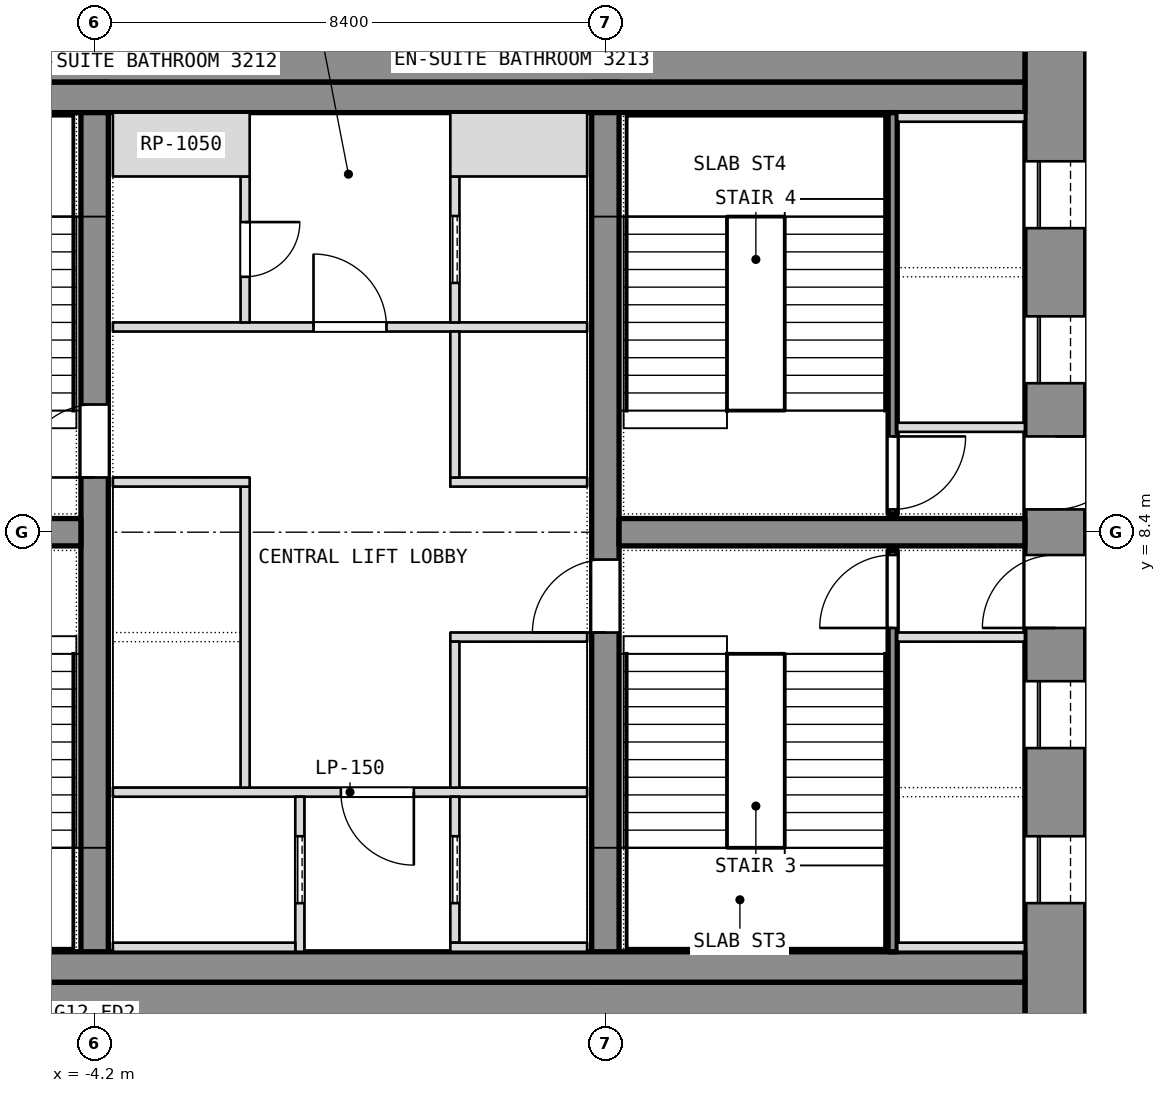
"""IFC4 building model, lengths in metres.
Left out: names, types, materials, properties, quantities, classifications, styles, units other than length and angle.
Written with IfcOpenShell. Run it as: python <this file> out.ifc"""

import sys

from ifc_helpers import new_model, si_unit, direction, frame, frame_2d, origin, place, context, subcontext, project, spatial, rectangle, extrude, element, fill, save


model = new_model("IFC4")
c1 = context("Model", 3, precision=1e-05, world=origin(), true_north=direction((0.0, 1.0)))
c2 = subcontext(c1, "Body", "Model", "MODEL_VIEW")
j1 = project(units=[si_unit("LENGTHUNIT", "METRE"), si_unit("PLANEANGLEUNIT", "RADIAN")], contexts=[c1])
p1 = place(None, origin())
s1 = spatial("IfcSite", under=j1, at=p1, CompositionType="ELEMENT")
p2 = place(p1, origin())
s2 = spatial("IfcBuilding", under=s1, at=p2, CompositionType="ELEMENT")
p3 = place(p2, frame((0.0, 0.0, 140.9)))
s3 = spatial("IfcBuildingStorey", under=s2, at=p3, CompositionType="ELEMENT", Elevation=140.9)
p4 = place(p3, frame((11.6, 0.0, 0.0), z_axis=(0.0, 0.0, 1.0), x_axis=(0.0, 1.0, 0.0)))
e1 = element("IfcWall", 1, at=p4, inside=s3, PredefinedType="SHEAR", context=c2, shape_type="SweptSolid", body=[
    extrude(rectangle(XDim=16.8, YDim=1.0, at=frame_2d((8.4, 0.0))), origin(), (0.0, 0.0, 1.0), 3.6),
])
p5 = place(p4, frame((2.3, 0.0, 0.0)))
e2 = element("IfcOpeningElement", 2, at=p5, cuts=e1, PredefinedType="OPENING", context=c2, shape_type="SweptSolid", body=[
    extrude(rectangle(XDim=1.1, YDim=2.1, at=frame_2d((0.55, 1.05))), frame((0.0, 0.5, 0.0), z_axis=(0.0, -1.0, 0.0), x_axis=(1.0, 0.0, 0.0)), (0.0, 0.0, 1.0), 1.0),
])
p6 = place(p4, frame((4.85, 0.0, 0.0)))
e3 = element("IfcOpeningElement", 3, at=p6, cuts=e1, PredefinedType="OPENING", context=c2, shape_type="SweptSolid", body=[
    extrude(rectangle(XDim=1.1, YDim=2.1, at=frame_2d((0.55, 1.05))), frame((0.0, 0.5, 0.0), z_axis=(0.0, -1.0, 0.0), x_axis=(1.0, 0.0, 0.0)), (0.0, 0.0, 1.0), 1.0),
])
p7 = place(p4, frame((6.825, 0.0, 0.0)))
e4 = element("IfcOpeningElement", 4, at=p7, cuts=e1, PredefinedType="OPENING", context=c2, shape_type="SweptSolid", body=[
    extrude(rectangle(XDim=1.2, YDim=2.1, at=frame_2d((0.6, 1.05))), frame((0.0, 0.5, 0.0), z_axis=(0.0, -1.0, 0.0), x_axis=(1.0, 0.0, 0.0)), (0.0, 0.0, 1.0), 1.0),
])
p8 = place(p4, frame((13.4, 0.0, 0.0)))
e5 = element("IfcOpeningElement", 5, at=p8, cuts=e1, PredefinedType="OPENING", context=c2, shape_type="SweptSolid", body=[
    extrude(rectangle(XDim=1.1, YDim=2.1, at=frame_2d((0.55, 1.05))), frame((0.0, 0.5, 0.0), z_axis=(0.0, -1.0, 0.0), x_axis=(1.0, 0.0, 0.0)), (0.0, 0.0, 1.0), 1.0),
])
p9 = place(p4, frame((10.85, 0.0, 0.0)))
e6 = element("IfcOpeningElement", 6, at=p9, cuts=e1, PredefinedType="OPENING", context=c2, shape_type="SweptSolid", body=[
    extrude(rectangle(XDim=1.1, YDim=2.1, at=frame_2d((0.55, 1.05))), frame((0.0, 0.5, 0.0), z_axis=(0.0, -1.0, 0.0), x_axis=(1.0, 0.0, 0.0)), (0.0, 0.0, 1.0), 1.0),
])
p10 = place(p4, frame((8.775, 0.0, 0.0)))
e7 = element("IfcOpeningElement", 7, at=p10, cuts=e1, PredefinedType="OPENING", context=c2, shape_type="SweptSolid", body=[
    extrude(rectangle(XDim=1.2, YDim=2.1, at=frame_2d((0.6, 1.05))), frame((0.0, 0.5, 0.0), z_axis=(0.0, -1.0, 0.0), x_axis=(1.0, 0.0, 0.0)), (0.0, 0.0, 1.0), 1.0),
])
for number, where, z_axis, x_axis in (
    (8, (-11.1, 0.5, 0.0), (0.0, 0.0, 1.0), (1.0, 0.0, 0.0)),
    (9, (-11.1, 16.3, 0.0), (0.0, 0.0, 1.0), (1.0, 0.0, 0.0)),
):
    element("IfcWall", number, at=place(p3, frame(where, z_axis=z_axis, x_axis=x_axis)), inside=s3, PredefinedType="SHEAR", context=c2, shape_type="SweptSolid", body=[
        extrude(rectangle(XDim=22.2, YDim=1.0, at=frame_2d((11.1, 0.0))), origin(), (0.0, 0.0, 1.0), 3.6),
    ])
p11 = place(p3, frame((-4.2, 1.0, 0.0), z_axis=(0.0, 0.0, 1.0), x_axis=(0.0, 1.0, 0.0)))
e10 = element("IfcWall", 10, at=p11, inside=s3, PredefinedType="SHEAR", context=c2, shape_type="SweptSolid", body=[
    extrude(rectangle(XDim=14.8, YDim=0.45, at=frame_2d((7.4, 0.0))), origin(), (0.0, 0.0, 1.0), 3.6),
])
p12 = place(p11, frame((8.3, 0.0, 0.0)))
e11 = element("IfcOpeningElement", 11, at=p12, cuts=e10, PredefinedType="OPENING", context=c2, shape_type="SweptSolid", body=[
    extrude(rectangle(XDim=1.2, YDim=2.1, at=frame_2d((0.6, 1.05))), frame((0.0, 0.225, 0.0), z_axis=(0.0, -1.0, 0.0), x_axis=(1.0, 0.0, 0.0)), (0.0, 0.0, 1.0), 0.45),
])
p13 = place(p3, frame((4.2, 1.0, 0.0), z_axis=(0.0, 0.0, 1.0), x_axis=(0.0, 1.0, 0.0)))
e12 = element("IfcWall", 12, at=p13, inside=s3, PredefinedType="SHEAR", context=c2, shape_type="SweptSolid", body=[
    extrude(rectangle(XDim=14.8, YDim=0.45, at=frame_2d((7.4, 0.0))), origin(), (0.0, 0.0, 1.0), 3.6),
])
p14 = place(p13, frame((5.75, 0.0, 0.0)))
e13 = element("IfcOpeningElement", 13, at=p14, cuts=e12, PredefinedType="OPENING", context=c2, shape_type="SweptSolid", body=[
    extrude(rectangle(XDim=1.2, YDim=2.1, at=frame_2d((0.6, 1.05))), frame((0.0, 0.225, 0.0), z_axis=(0.0, -1.0, 0.0), x_axis=(1.0, 0.0, 0.0)), (0.0, 0.0, 1.0), 0.45),
])
for number, where, z_axis, x_axis in (
    (14, (-11.1, 8.4, 0.0), (0.0, 0.0, 1.0), (1.0, 0.0, 0.0)),
    (15, (4.425, 8.4, 0.0), (0.0, 0.0, 1.0), (1.0, 0.0, 0.0)),
):
    element("IfcWall", number, at=place(p3, frame(where, z_axis=z_axis, x_axis=x_axis)), inside=s3, PredefinedType="SHEAR", context=c2, shape_type="SweptSolid", body=[
        extrude(rectangle(XDim=6.675, YDim=0.45, at=frame_2d((3.337, 0.0))), origin(), (0.0, 0.0, 1.0), 3.6),
    ])
for number, where, z_axis, x_axis in (
    (16, (-11.1, 1.25, 0.0), (0.0, 0.0, 1.0), (1.0, 0.0, 0.0)),
    (17, (-11.1, 15.55, 0.0), (0.0, 0.0, 1.0), (1.0, 0.0, 0.0)),
):
    element("IfcWall", number, at=place(p3, frame(where, z_axis=z_axis, x_axis=x_axis)), inside=s3, PredefinedType="PARTITIONING", context=c2, shape_type="SweptSolid", body=[
        extrude(rectangle(XDim=22.2, YDim=0.5, at=frame_2d((11.1, 0.0))), origin(), (0.0, 0.0, 1.0), 3.34),
    ])
p15 = place(p3, frame((8.925, 1.5, 0.0), z_axis=(0.0, 0.0, 1.0), x_axis=(0.0, 1.0, 0.0)))
e18 = element("IfcWall", 18, at=p15, inside=s3, PredefinedType="SHEAR", context=c2, shape_type="SweptSolid", body=[
    extrude(rectangle(XDim=6.6, YDim=0.15, at=frame_2d((3.3, 0.0))), origin(), (0.0, 0.0, 1.0), 3.34),
])
p16 = place(p15, frame((5.325, 0.0, 0.0)))
e19 = element("IfcOpeningElement", 19, at=p16, cuts=e18, PredefinedType="OPENING", context=c2, shape_type="SweptSolid", body=[
    extrude(rectangle(XDim=1.2, YDim=2.1, at=frame_2d((0.6, 1.05))), frame((0.0, 0.075, 0.0), z_axis=(0.0, -1.0, 0.0), x_axis=(1.0, 0.0, 0.0)), (0.0, 0.0, 1.0), 0.15),
])
for number, where, z_axis, x_axis in (
    (20, (9.0, 6.675, 0.0), (0.0, 0.0, 1.0), (1.0, 0.0, 0.0)),
    (21, (9.0, 1.575, 0.0), (0.0, 0.0, 1.0), (1.0, 0.0, 0.0)),
):
    element("IfcWall", number, at=place(p3, frame(where, z_axis=z_axis, x_axis=x_axis)), inside=s3, PredefinedType="SHEAR", context=c2, shape_type="SweptSolid", body=[
        extrude(rectangle(XDim=2.1, YDim=0.15, at=frame_2d((1.05, 0.0))), origin(), (0.0, 0.0, 1.0), 3.6),
    ])
p17 = place(p3, frame((8.925, 8.7, 0.0), z_axis=(0.0, 0.0, 1.0), x_axis=(0.0, 1.0, 0.0)))
e22 = element("IfcWall", 22, at=p17, inside=s3, PredefinedType="SHEAR", context=c2, shape_type="SweptSolid", body=[
    extrude(rectangle(XDim=6.6, YDim=0.15, at=frame_2d((3.3, 0.0))), origin(), (0.0, 0.0, 1.0), 3.34),
])
p18 = place(p17, frame((0.075, 0.0, 0.0)))
e23 = element("IfcOpeningElement", 23, at=p18, cuts=e22, PredefinedType="OPENING", context=c2, shape_type="SweptSolid", body=[
    extrude(rectangle(XDim=1.2, YDim=2.1, at=frame_2d((0.6, 1.05))), frame((0.0, 0.075, 0.0), z_axis=(0.0, -1.0, 0.0), x_axis=(1.0, 0.0, 0.0)), (0.0, 0.0, 1.0), 0.15),
])
for number, where, z_axis, x_axis in (
    (24, (9.0, 10.125, 0.0), (0.0, 0.0, 1.0), (1.0, 0.0, 0.0)),
    (25, (9.0, 15.225, 0.0), (0.0, 0.0, 1.0), (1.0, 0.0, 0.0)),
):
    element("IfcWall", number, at=place(p3, frame(where, z_axis=z_axis, x_axis=x_axis)), inside=s3, PredefinedType="SHEAR", context=c2, shape_type="SweptSolid", body=[
        extrude(rectangle(XDim=2.1, YDim=0.15, at=frame_2d((1.05, 0.0))), origin(), (0.0, 0.0, 1.0), 3.6),
    ])
p19 = place(p3, frame((-3.9, 4.125, 0.0), z_axis=(0.0, 0.0, 1.0), x_axis=(1.0, 0.0, 0.0)))
e26 = element("IfcWall", 26, at=p19, inside=s3, PredefinedType="PARTITIONING", context=c2, shape_type="SweptSolid", body=[
    extrude(rectangle(XDim=7.8, YDim=0.15, at=frame_2d((3.9, 0.0))), origin(), (0.0, 0.0, 1.0), 3.34),
])
p20 = place(p19, frame((3.75, 0.0, 0.0)))
e27 = element("IfcOpeningElement", 27, at=p20, cuts=e26, PredefinedType="OPENING", context=c2, shape_type="SweptSolid", body=[
    extrude(rectangle(XDim=1.2, YDim=2.1, at=frame_2d((0.6, 1.05))), frame((0.0, 0.075, 0.0), z_axis=(0.0, -1.0, 0.0), x_axis=(1.0, 0.0, 0.0)), (0.0, 0.0, 1.0), 0.15),
])
p21 = place(p3, frame((-3.9, 11.775, 0.0), z_axis=(0.0, 0.0, 1.0), x_axis=(1.0, 0.0, 0.0)))
e28 = element("IfcWall", 28, at=p21, inside=s3, PredefinedType="PARTITIONING", context=c2, shape_type="SweptSolid", body=[
    extrude(rectangle(XDim=7.8, YDim=0.15, at=frame_2d((3.9, 0.0))), origin(), (0.0, 0.0, 1.0), 3.34),
])
p22 = place(p21, frame((3.3, 0.0, 0.0)))
e29 = element("IfcOpeningElement", 29, at=p22, cuts=e28, PredefinedType="OPENING", context=c2, shape_type="SweptSolid", body=[
    extrude(rectangle(XDim=1.2, YDim=2.1, at=frame_2d((0.6, 1.05))), frame((0.0, 0.075, 0.0), z_axis=(0.0, -1.0, 0.0), x_axis=(1.0, 0.0, 0.0)), (0.0, 0.0, 1.0), 0.15),
])
p23 = place(p3, frame((-0.825, 1.5, 0.0), z_axis=(0.0, 0.0, 1.0), x_axis=(0.0, 1.0, 0.0)))
e30 = element("IfcWall", 30, at=p23, inside=s3, PredefinedType="SHEAR", context=c2, shape_type="SweptSolid", body=[
    extrude(rectangle(XDim=2.55, YDim=0.15, at=frame_2d((1.275, 0.0))), origin(), (0.0, 0.0, 1.0), 3.6),
])
p24 = place(p23, frame((0.8, 0.0, 0.0)))
e31 = element("IfcOpeningElement", 31, at=p24, cuts=e30, PredefinedType="OPENING", context=c2, shape_type="SweptSolid", body=[
    extrude(rectangle(XDim=1.1, YDim=2.1, at=frame_2d((0.55, 1.05))), frame((0.0, 0.075, 0.0), z_axis=(0.0, -1.0, 0.0), x_axis=(1.0, 0.0, 0.0)), (0.0, 0.0, 1.0), 0.15),
])
p25 = place(p3, frame((-3.9, 1.575, 0.0), z_axis=(0.0, 0.0, 1.0), x_axis=(1.0, 0.0, 0.0)))
e32 = element("IfcWall", 32, at=p25, inside=s3, PredefinedType="SHEAR", context=c2, shape_type="SweptSolid", body=[
    extrude(rectangle(XDim=3.0, YDim=0.15, at=frame_2d((1.5, 0.0))), origin(), (0.0, 0.0, 1.0), 3.6),
])
p26 = place(p3, frame((-1.725, 4.2, 0.0), z_axis=(0.0, 0.0, 1.0), x_axis=(0.0, 1.0, 0.0)))
e33 = element("IfcWall", 33, at=p26, inside=s3, PredefinedType="SHEAR", context=c2, shape_type="SweptSolid", body=[
    extrude(rectangle(XDim=4.95, YDim=0.15, at=frame_2d((2.475, 0.0))), origin(), (0.0, 0.0, 1.0), 3.6),
])
p27 = place(p3, frame((-3.9, 9.225, 0.0), z_axis=(0.0, 0.0, 1.0), x_axis=(1.0, 0.0, 0.0)))
e34 = element("IfcWall", 34, at=p27, inside=s3, PredefinedType="SHEAR", context=c2, shape_type="SweptSolid", body=[
    extrude(rectangle(XDim=2.25, YDim=0.15, at=frame_2d((1.125, 0.0))), origin(), (0.0, 0.0, 1.0), 3.6),
])
p28 = place(p3, frame((-1.725, 11.85, 0.0), z_axis=(0.0, 0.0, 1.0), x_axis=(0.0, 1.0, 0.0)))
e35 = element("IfcWall", 35, at=p28, inside=s3, PredefinedType="PARTITIONING", context=c2, shape_type="SweptSolid", body=[
    extrude(rectangle(XDim=2.4, YDim=0.15, at=frame_2d((1.2, 0.0))), origin(), (0.0, 0.0, 1.0), 3.34),
])
p29 = place(p28, frame((0.75, 0.0, 0.0)))
e36 = element("IfcOpeningElement", 36, at=p29, cuts=e35, PredefinedType="OPENING", context=c2, shape_type="SweptSolid", body=[
    extrude(rectangle(XDim=0.9, YDim=2.1, at=frame_2d((0.45, 1.05))), frame((0.0, 0.075, 0.0), z_axis=(0.0, -1.0, 0.0), x_axis=(1.0, 0.0, 0.0)), (0.0, 0.0, 1.0), 0.15),
])
p30 = place(p3, frame((-3.9, 14.775, 0.0), z_axis=(0.0, 0.0, 1.0), x_axis=(1.0, 0.0, 0.0)))
e37 = element("IfcWall", 37, at=p30, inside=s3, PredefinedType="PARTITIONING", context=c2, shape_type="SweptSolid", body=[
    extrude(rectangle(XDim=2.25, YDim=1.05, at=frame_2d((1.125, 0.0))), origin(), (0.0, 0.0, 1.0), 3.34),
])
p31 = place(p3, frame((1.725, 1.65, 0.0), z_axis=(0.0, 0.0, 1.0), x_axis=(0.0, 1.0, 0.0)))
e38 = element("IfcWall", 38, at=p31, inside=s3, PredefinedType="SHEAR", context=c2, shape_type="SweptSolid", body=[
    extrude(rectangle(XDim=2.4, YDim=0.15, at=frame_2d((1.2, 0.0))), origin(), (0.0, 0.0, 1.0), 3.6),
])
p32 = place(p31, frame((0.65, 0.0, 0.0)))
e39 = element("IfcOpeningElement", 39, at=p32, cuts=e38, PredefinedType="OPENING", context=c2, shape_type="SweptSolid", body=[
    extrude(rectangle(XDim=1.1, YDim=2.1, at=frame_2d((0.55, 1.05))), frame((0.0, 0.075, 0.0), z_axis=(0.0, -1.0, 0.0), x_axis=(1.0, 0.0, 0.0)), (0.0, 0.0, 1.0), 0.15),
])
p33 = place(p3, frame((1.65, 1.575, 0.0), z_axis=(0.0, 0.0, 1.0), x_axis=(1.0, 0.0, 0.0)))
e40 = element("IfcWall", 40, at=p33, inside=s3, PredefinedType="SHEAR", context=c2, shape_type="SweptSolid", body=[
    extrude(rectangle(XDim=2.25, YDim=0.15, at=frame_2d((1.125, 0.0))), origin(), (0.0, 0.0, 1.0), 3.6),
])
p34 = place(p3, frame((1.725, 11.85, 0.0), z_axis=(0.0, 0.0, 1.0), x_axis=(0.0, 1.0, 0.0)))
e41 = element("IfcWall", 41, at=p34, inside=s3, PredefinedType="SHEAR", context=c2, shape_type="SweptSolid", body=[
    extrude(rectangle(XDim=2.4, YDim=0.15, at=frame_2d((1.2, 0.0))), origin(), (0.0, 0.0, 1.0), 3.6),
])
p35 = place(p34, frame((0.65, 0.0, 0.0)))
e42 = element("IfcOpeningElement", 42, at=p35, cuts=e41, PredefinedType="OPENING", context=c2, shape_type="SweptSolid", body=[
    extrude(rectangle(XDim=1.1, YDim=2.1, at=frame_2d((0.55, 1.05))), frame((0.0, 0.075, 0.0), z_axis=(0.0, -1.0, 0.0), x_axis=(1.0, 0.0, 0.0)), (0.0, 0.0, 1.0), 0.15),
])
p36 = place(p3, frame((1.65, 14.775, 0.0), z_axis=(0.0, 0.0, 1.0), x_axis=(1.0, 0.0, 0.0)))
e43 = element("IfcWall", 43, at=p36, inside=s3, PredefinedType="SHEAR", context=c2, shape_type="SweptSolid", body=[
    extrude(rectangle(XDim=2.25, YDim=1.05, at=frame_2d((1.125, 0.0))), origin(), (0.0, 0.0, 1.0), 3.6),
])
for number, where, z_axis, x_axis in (
    (44, (1.65, 6.675, 0.0), (0.0, 0.0, 1.0), (1.0, 0.0, 0.0)),
    (45, (1.65, 9.225, 0.0), (0.0, 0.0, 1.0), (1.0, 0.0, 0.0)),
):
    element("IfcWall", number, at=place(p3, frame(where, z_axis=z_axis, x_axis=x_axis)), inside=s3, PredefinedType="SHEAR", context=c2, shape_type="SweptSolid", body=[
        extrude(rectangle(XDim=2.25, YDim=0.15, at=frame_2d((1.125, 0.0))), origin(), (0.0, 0.0, 1.0), 3.6),
    ])
p37 = place(p3, frame((1.725, 4.2, 0.0), z_axis=(0.0, 0.0, 1.0), x_axis=(0.0, 1.0, 0.0)))
e46 = element("IfcWall", 46, at=p37, inside=s3, PredefinedType="SHEAR", context=c2, shape_type="SweptSolid", body=[
    extrude(rectangle(XDim=2.4, YDim=0.15, at=frame_2d((1.2, 0.0))), origin(), (0.0, 0.0, 1.0), 3.6),
])
p38 = place(p3, frame((1.725, 9.3, 0.0), z_axis=(0.0, 0.0, 1.0), x_axis=(0.0, 1.0, 0.0)))
e47 = element("IfcWall", 47, at=p38, inside=s3, PredefinedType="SHEAR", context=c2, shape_type="SweptSolid", body=[
    extrude(rectangle(XDim=2.4, YDim=0.15, at=frame_2d((1.2, 0.0))), origin(), (0.0, 0.0, 1.0), 3.6),
])
p39 = place(p5, origin())
e48 = element("IfcDoor", 48, at=p39, inside=s3, OperationType="SLIDING_TO_LEFT", PredefinedType="DOOR", context=c2, shape_type="SweptSolid", body=[
    extrude(rectangle(XDim=1.1, YDim=2.1, at=frame_2d((0.55, 1.05))), frame((0.0, 0.025, 0.0), z_axis=(0.0, -1.0, 0.0), x_axis=(1.0, 0.0, 0.0)), (0.0, 0.0, 1.0), 0.05),
])
fill(e2, e48)
p40 = place(p6, origin())
e49 = element("IfcDoor", 49, at=p40, inside=s3, OperationType="SLIDING_TO_LEFT", PredefinedType="DOOR", context=c2, shape_type="SweptSolid", body=[
    extrude(rectangle(XDim=1.1, YDim=2.1, at=frame_2d((0.55, 1.05))), frame((0.0, 0.025, 0.0), z_axis=(0.0, -1.0, 0.0), x_axis=(1.0, 0.0, 0.0)), (0.0, 0.0, 1.0), 0.05),
])
fill(e3, e49)
p41 = place(p7, origin())
e50 = element("IfcDoor", 50, at=p41, inside=s3, OperationType="SINGLE_SWING_LEFT", PredefinedType="DOOR", context=c2, shape_type="SweptSolid", body=[
    extrude(rectangle(XDim=1.2, YDim=2.1, at=frame_2d((0.6, 1.05))), frame((0.0, 0.025, 0.0), z_axis=(0.0, -1.0, 0.0), x_axis=(1.0, 0.0, 0.0)), (0.0, 0.0, 1.0), 0.05),
])
fill(e4, e50)
p42 = place(p16, origin())
e51 = element("IfcDoor", 51, at=p42, inside=s3, OperationType="SINGLE_SWING_LEFT", PredefinedType="DOOR", context=c2, shape_type="SweptSolid", body=[
    extrude(rectangle(XDim=1.2, YDim=2.1, at=frame_2d((0.6, 1.05))), frame((0.0, 0.025, 0.0), z_axis=(0.0, -1.0, 0.0), x_axis=(1.0, 0.0, 0.0)), (0.0, 0.0, 1.0), 0.05),
])
fill(e19, e51)
p43 = place(p8, origin())
e52 = element("IfcDoor", 52, at=p43, inside=s3, OperationType="SLIDING_TO_LEFT", PredefinedType="DOOR", context=c2, shape_type="SweptSolid", body=[
    extrude(rectangle(XDim=1.1, YDim=2.1, at=frame_2d((0.55, 1.05))), frame((0.0, 0.025, 0.0), z_axis=(0.0, -1.0, 0.0), x_axis=(1.0, 0.0, 0.0)), (0.0, 0.0, 1.0), 0.05),
])
fill(e5, e52)
p44 = place(p9, origin())
e53 = element("IfcDoor", 53, at=p44, inside=s3, OperationType="SLIDING_TO_LEFT", PredefinedType="DOOR", context=c2, shape_type="SweptSolid", body=[
    extrude(rectangle(XDim=1.1, YDim=2.1, at=frame_2d((0.55, 1.05))), frame((0.0, 0.025, 0.0), z_axis=(0.0, -1.0, 0.0), x_axis=(1.0, 0.0, 0.0)), (0.0, 0.0, 1.0), 0.05),
])
fill(e6, e53)
p45 = place(p10, origin())
e54 = element("IfcDoor", 54, at=p45, inside=s3, OperationType="SINGLE_SWING_LEFT", PredefinedType="DOOR", context=c2, shape_type="SweptSolid", body=[
    extrude(rectangle(XDim=1.2, YDim=2.1, at=frame_2d((0.6, 1.05))), frame((0.0, 0.025, 0.0), z_axis=(0.0, -1.0, 0.0), x_axis=(1.0, 0.0, 0.0)), (0.0, 0.0, 1.0), 0.05),
])
fill(e7, e54)
p46 = place(p18, origin())
e55 = element("IfcDoor", 55, at=p46, inside=s3, OperationType="SINGLE_SWING_LEFT", PredefinedType="DOOR", context=c2, shape_type="SweptSolid", body=[
    extrude(rectangle(XDim=1.2, YDim=2.1, at=frame_2d((0.6, 1.05))), frame((0.0, 0.025, 0.0), z_axis=(0.0, -1.0, 0.0), x_axis=(1.0, 0.0, 0.0)), (0.0, 0.0, 1.0), 0.05),
])
fill(e23, e55)
p47 = place(p24, origin())
e56 = element("IfcDoor", 56, at=p47, inside=s3, OperationType="SLIDING_TO_LEFT", PredefinedType="DOOR", context=c2, shape_type="SweptSolid", body=[
    extrude(rectangle(XDim=1.1, YDim=2.1, at=frame_2d((0.55, 1.05))), frame((0.0, 0.025, 0.0), z_axis=(0.0, -1.0, 0.0), x_axis=(1.0, 0.0, 0.0)), (0.0, 0.0, 1.0), 0.05),
])
fill(e31, e56)
p48 = place(p32, origin())
e57 = element("IfcDoor", 57, at=p48, inside=s3, OperationType="SLIDING_TO_LEFT", PredefinedType="DOOR", context=c2, shape_type="SweptSolid", body=[
    extrude(rectangle(XDim=1.1, YDim=2.1, at=frame_2d((0.55, 1.05))), frame((0.0, 0.025, 0.0), z_axis=(0.0, -1.0, 0.0), x_axis=(1.0, 0.0, 0.0)), (0.0, 0.0, 1.0), 0.05),
])
fill(e39, e57)
p49 = place(p35, origin())
e58 = element("IfcDoor", 58, at=p49, inside=s3, OperationType="SLIDING_TO_LEFT", PredefinedType="DOOR", context=c2, shape_type="SweptSolid", body=[
    extrude(rectangle(XDim=1.1, YDim=2.1, at=frame_2d((0.55, 1.05))), frame((0.0, 0.025, 0.0), z_axis=(0.0, -1.0, 0.0), x_axis=(1.0, 0.0, 0.0)), (0.0, 0.0, 1.0), 0.05),
])
fill(e42, e58)
p50 = place(p20, origin())
e59 = element("IfcDoor", 59, at=p50, inside=s3, OperationType="SINGLE_SWING_LEFT", PredefinedType="DOOR", context=c2, shape_type="SweptSolid", body=[
    extrude(rectangle(XDim=1.2, YDim=2.1, at=frame_2d((0.6, 1.05))), frame((0.0, 0.025, 0.0), z_axis=(0.0, -1.0, 0.0), x_axis=(1.0, 0.0, 0.0)), (0.0, 0.0, 1.0), 0.05),
])
fill(e27, e59)
p51 = place(p22, origin())
e60 = element("IfcDoor", 60, at=p51, inside=s3, OperationType="SINGLE_SWING_LEFT", PredefinedType="DOOR", context=c2, shape_type="SweptSolid", body=[
    extrude(rectangle(XDim=1.2, YDim=2.1, at=frame_2d((0.6, 1.05))), frame((0.0, 0.025, 0.0), z_axis=(0.0, -1.0, 0.0), x_axis=(1.0, 0.0, 0.0)), (0.0, 0.0, 1.0), 0.05),
])
fill(e29, e60)
p52 = place(p29, origin())
e61 = element("IfcDoor", 61, at=p52, inside=s3, OperationType="SINGLE_SWING_LEFT", PredefinedType="DOOR", context=c2, shape_type="SweptSolid", body=[
    extrude(rectangle(XDim=0.9, YDim=2.1, at=frame_2d((0.45, 1.05))), frame((0.0, 0.025, 0.0), z_axis=(0.0, -1.0, 0.0), x_axis=(1.0, 0.0, 0.0)), (0.0, 0.0, 1.0), 0.05),
])
fill(e36, e61)
p53 = place(p12, origin())
e62 = element("IfcDoor", 62, at=p53, inside=s3, OperationType="SINGLE_SWING_LEFT", PredefinedType="DOOR", context=c2, shape_type="SweptSolid", body=[
    extrude(rectangle(XDim=1.2, YDim=2.1, at=frame_2d((0.6, 1.05))), frame((0.0, 0.025, 0.0), z_axis=(0.0, -1.0, 0.0), x_axis=(1.0, 0.0, 0.0)), (0.0, 0.0, 1.0), 0.05),
])
fill(e11, e62)
p54 = place(p14, origin())
e63 = element("IfcDoor", 63, at=p54, inside=s3, OperationType="SINGLE_SWING_LEFT", PredefinedType="DOOR", context=c2, shape_type="SweptSolid", body=[
    extrude(rectangle(XDim=1.2, YDim=2.1, at=frame_2d((0.6, 1.05))), frame((0.0, 0.025, 0.0), z_axis=(0.0, -1.0, 0.0), x_axis=(1.0, 0.0, 0.0)), (0.0, 0.0, 1.0), 0.05),
])
fill(e13, e63)
save(model, sys.argv[1])
